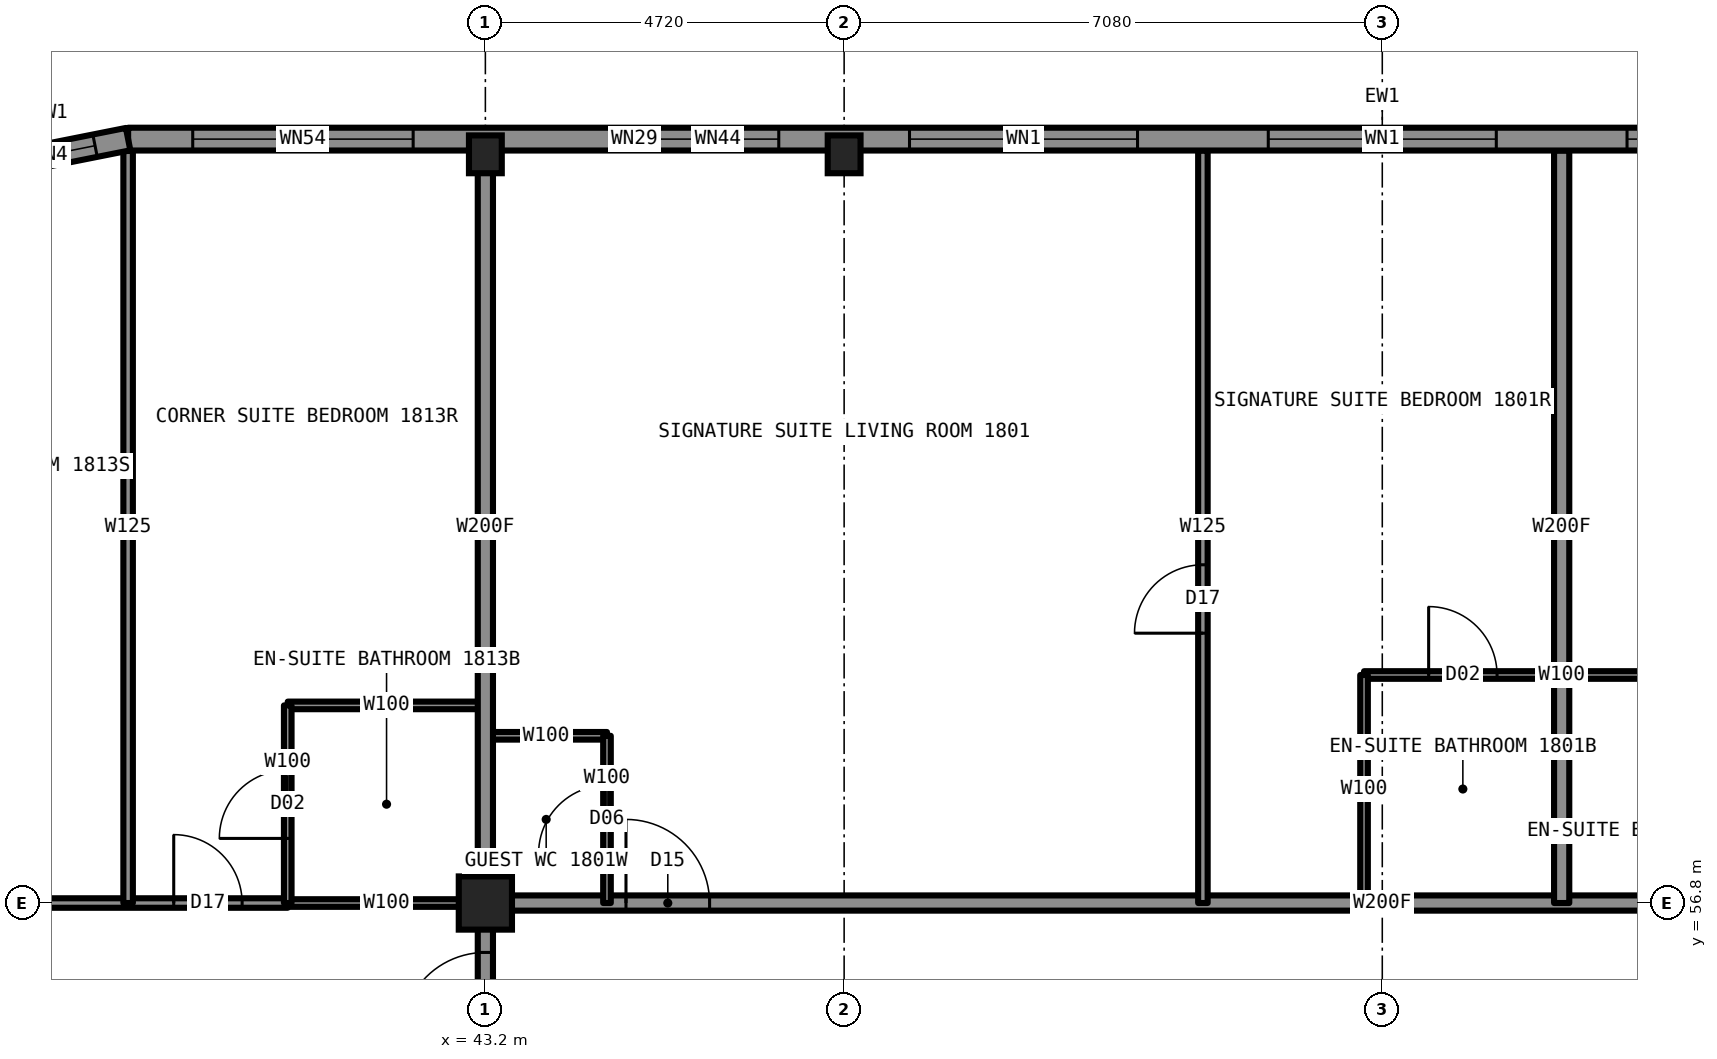
"""IFC4 building model, lengths in metres.
Left out: names, types, materials, properties, quantities, classifications, styles, units other than length and angle.
Written with IfcOpenShell. Run it as: python <this file> out.ifc"""

import sys

from ifc_helpers import new_model, si_unit, direction, frame, frame_2d, origin, origin_2d, place, context, subcontext, project, spatial, rectangle, hollow_rectangle, i_section, extrude, element, fill, save


model = new_model("IFC4")
c1 = context("Model", 3, precision=1e-05, world=origin(), true_north=direction((0.0, 1.0)))
c2 = subcontext(c1, "Body", "Model", "MODEL_VIEW")
j1 = project(units=[si_unit("LENGTHUNIT", "METRE"), si_unit("PLANEANGLEUNIT", "RADIAN")], contexts=[c1])
p1 = place(None, origin())
s1 = spatial("IfcSite", under=j1, at=p1, CompositionType="ELEMENT")
p2 = place(p1, origin())
s2 = spatial("IfcBuilding", under=s1, at=p2, CompositionType="ELEMENT")
p3 = place(p2, frame((0.0, 0.0, 70.5)))
s3 = spatial("IfcBuildingStorey", under=s2, at=p3, CompositionType="ELEMENT", Elevation=70.5)
for number, where, z_axis, x_axis in (
    (1, (43.2, 66.65, 0.0), (0.0, 0.0, 1.0), (1.0, 0.0, 0.0)),
    (2, (47.92, 66.65, 0.0), (0.0, 0.0, 1.0), (1.0, 0.0, 0.0)),
):
    element("IfcColumn", number, at=place(p3, frame(where, z_axis=z_axis, x_axis=x_axis)), inside=s3, PredefinedType="COLUMN", context=c2, shape_type="SweptSolid", body=[
        extrude(i_section(OverallWidth=0.432, OverallDepth=0.498, WebThickness=0.056, FlangeThickness=0.089, at=origin_2d()), origin(), (0.0, 0.0, 1.0), 3.5),
    ])
p4 = place(p3, frame((43.2, 56.8, 0.0), z_axis=(0.0, 0.0, 1.0), x_axis=(1.0, 0.0, 0.0)))
e3 = element("IfcColumn", 3, at=p4, inside=s3, PredefinedType="COLUMN", context=c2, shape_type="SweptSolid", body=[
    extrude(hollow_rectangle(XDim=0.7, YDim=0.7, WallThickness=0.06, at=origin_2d()), origin(), (0.0, 0.0, 1.0), 3.5),
])
p5 = place(p3, frame((40.6, 56.8, 0.0), z_axis=(0.0, 0.0, 1.0), x_axis=(1.0, 0.0, 0.0)))
e4 = element("IfcWall", 4, at=p5, inside=s3, PredefinedType="PARTITIONING", context=c2, shape_type="SweptSolid", body=[
    extrude(rectangle(XDim=2.6, YDim=0.1, at=frame_2d((1.3, 0.0))), origin(), (0.0, 0.0, 1.0), 2.573),
])
p6 = place(p3, frame((43.2, 56.8, 0.0), z_axis=(0.0, 0.0, 1.0), x_axis=(1.0, 0.0, 0.0)))
e5 = element("IfcWall", 5, at=p6, inside=s3, PredefinedType="PARTITIONING", context=c2, shape_type="SweptSolid", body=[
    extrude(rectangle(XDim=23.6, YDim=0.2, at=frame_2d((11.8, 0.0))), origin(), (0.0, 0.0, 1.0), 3.33),
])
p7 = place(p6, frame((1.85, 0.0, 0.0)))
e6 = element("IfcOpeningElement", 6, at=p7, cuts=e5, PredefinedType="OPENING", context=c2, shape_type="SweptSolid", body=[
    extrude(rectangle(XDim=1.1, YDim=2.2, at=frame_2d((0.55, 1.1))), frame((0.0, 0.11, 0.0), z_axis=(0.0, -1.0, 0.0), x_axis=(1.0, 0.0, 0.0)), (0.0, 0.0, 1.0), 0.22),
])
p8 = place(p6, frame((17.16, 0.0, 0.0)))
e7 = element("IfcOpeningElement", 7, at=p8, cuts=e5, PredefinedType="OPENING", context=c2, shape_type="SweptSolid", body=[
    extrude(rectangle(XDim=1.0, YDim=2.2, at=frame_2d((0.5, 1.1))), frame((0.0, 0.11, 0.0), z_axis=(0.0, -1.0, 0.0), x_axis=(1.0, 0.0, 0.0)), (0.0, 0.0, 1.0), 0.22),
])
p9 = place(p3, frame((33.3, 56.8, 0.0), z_axis=(0.0, 0.0, 1.0), x_axis=(1.0, 0.0, 0.0)))
e8 = element("IfcWall", 8, at=p9, inside=s3, PredefinedType="PARTITIONING", context=c2, shape_type="SweptSolid", body=[
    extrude(rectangle(XDim=7.3, YDim=0.125, at=frame_2d((3.65, 0.0))), origin(), (0.0, 0.0, 1.0), 2.573),
])
p10 = place(p9, frame((5.8, 0.0, 0.0)))
e9 = element("IfcOpeningElement", 9, at=p10, cuts=e8, PredefinedType="OPENING", context=c2, shape_type="SweptSolid", body=[
    extrude(rectangle(XDim=0.9, YDim=2.2, at=frame_2d((0.45, 1.1))), frame((0.0, 0.073, 0.0), z_axis=(0.0, -1.0, 0.0), x_axis=(1.0, 0.0, 0.0)), (0.0, 0.0, 1.0), 0.145),
])
p11 = place(p9, frame((2.0, 0.0, 0.0)))
e10 = element("IfcOpeningElement", 10, at=p11, cuts=e8, PredefinedType="OPENING", context=c2, shape_type="SweptSolid", body=[
    extrude(rectangle(XDim=0.9, YDim=2.2, at=frame_2d((0.45, 1.1))), frame((0.0, 0.073, 0.0), z_axis=(0.0, -1.0, 0.0), x_axis=(1.0, 0.0, 0.0)), (0.0, 0.0, 1.0), 0.145),
])
p12 = place(p3, frame((43.2, 59.0, 0.0), z_axis=(0.0, 0.0, 1.0), x_axis=(1.0, 0.0, 0.0)))
e11 = element("IfcWall", 11, at=p12, inside=s3, PredefinedType="PARTITIONING", context=c2, shape_type="SweptSolid", body=[
    extrude(rectangle(XDim=1.6, YDim=0.1, at=frame_2d((0.8, 0.0))), origin(), (0.0, 0.0, 1.0), 3.33),
])
p13 = place(p3, frame((40.6, 59.4, 0.0), z_axis=(0.0, 0.0, 1.0), x_axis=(1.0, 0.0, 0.0)))
e12 = element("IfcWall", 12, at=p13, inside=s3, PredefinedType="PARTITIONING", context=c2, shape_type="SweptSolid", body=[
    extrude(rectangle(XDim=2.6, YDim=0.1, at=frame_2d((1.3, 0.0))), origin(), (0.0, 0.0, 1.0), 3.33),
])
p14 = place(p3, frame((54.76, 59.8, 0.0), z_axis=(0.0, 0.0, 1.0), x_axis=(1.0, 0.0, 0.0)))
e13 = element("IfcWall", 13, at=p14, inside=s3, PredefinedType="PARTITIONING", context=c2, shape_type="SweptSolid", body=[
    extrude(rectangle(XDim=5.2, YDim=0.1, at=frame_2d((2.6, 0.0))), origin(), (0.0, 0.0, 1.0), 3.33),
])
p15 = place(p14, frame((0.85, 0.0, 0.0)))
e14 = element("IfcOpeningElement", 14, at=p15, cuts=e13, PredefinedType="OPENING", context=c2, shape_type="SweptSolid", body=[
    extrude(rectangle(XDim=0.9, YDim=2.1, at=frame_2d((0.45, 1.05))), frame((0.0, 0.06, 0.0), z_axis=(0.0, -1.0, 0.0), x_axis=(1.0, 0.0, 0.0)), (0.0, 0.0, 1.0), 0.12),
])
p16 = place(p3, frame((54.76, 56.8, 0.0), z_axis=(0.0, 0.0, 1.0), x_axis=(0.0, 1.0, 0.0)))
e15 = element("IfcWall", 15, at=p16, inside=s3, PredefinedType="PARTITIONING", context=c2, shape_type="SweptSolid", body=[
    extrude(rectangle(XDim=3.0, YDim=0.1, at=frame_2d((1.5, 0.0))), origin(), (0.0, 0.0, 1.0), 3.33),
])
p17 = place(p3, frame((44.8, 56.8, 0.0), z_axis=(0.0, 0.0, 1.0), x_axis=(0.0, 1.0, 0.0)))
e16 = element("IfcWall", 16, at=p17, inside=s3, PredefinedType="PARTITIONING", context=c2, shape_type="SweptSolid", body=[
    extrude(rectangle(XDim=2.2, YDim=0.1, at=frame_2d((1.1, 0.0))), origin(), (0.0, 0.0, 1.0), 3.33),
])
p18 = place(p17, frame((0.65, 0.0, 0.0)))
e17 = element("IfcOpeningElement", 17, at=p18, cuts=e16, PredefinedType="OPENING", context=c2, shape_type="SweptSolid", body=[
    extrude(rectangle(XDim=0.9, YDim=2.1, at=frame_2d((0.45, 1.05))), frame((0.0, 0.06, 0.0), z_axis=(0.0, -1.0, 0.0), x_axis=(1.0, 0.0, 0.0)), (0.0, 0.0, 1.0), 0.12),
])
p19 = place(p3, frame((43.2, 33.2, 0.0), z_axis=(0.0, 0.0, 1.0), x_axis=(0.0, 1.0, 0.0)))
e18 = element("IfcWall", 18, at=p19, inside=s3, PredefinedType="PARTITIONING", context=c2, shape_type="SweptSolid", body=[
    extrude(rectangle(XDim=23.6, YDim=0.2, at=frame_2d((11.8, 0.0))), origin(), (0.0, 0.0, 1.0), 3.33),
])
p20 = place(p19, frame((7.87, 0.0, 0.0)))
e19 = element("IfcOpeningElement", 19, at=p20, cuts=e18, PredefinedType="OPENING", context=c2, shape_type="SweptSolid", body=[
    extrude(rectangle(XDim=1.0, YDim=2.2, at=frame_2d((0.5, 1.1))), frame((0.0, 0.11, 0.0), z_axis=(0.0, -1.0, 0.0), x_axis=(1.0, 0.0, 0.0)), (0.0, 0.0, 1.0), 0.22),
])
p21 = place(p19, frame((12.44, 0.0, 0.0)))
e20 = element("IfcOpeningElement", 20, at=p21, cuts=e18, PredefinedType="OPENING", context=c2, shape_type="SweptSolid", body=[
    extrude(rectangle(XDim=1.0, YDim=2.2, at=frame_2d((0.5, 1.1))), frame((0.0, 0.11, 0.0), z_axis=(0.0, -1.0, 0.0), x_axis=(1.0, 0.0, 0.0)), (0.0, 0.0, 1.0), 0.22),
])
p22 = place(p19, frame((21.85, 0.0, 0.0)))
e21 = element("IfcOpeningElement", 21, at=p22, cuts=e18, PredefinedType="OPENING", context=c2, shape_type="SweptSolid", body=[
    extrude(rectangle(XDim=1.1, YDim=2.2, at=frame_2d((0.55, 1.1))), frame((0.0, 0.11, 0.0), z_axis=(0.0, -1.0, 0.0), x_axis=(1.0, 0.0, 0.0)), (0.0, 0.0, 1.0), 0.22),
])
p23 = place(p19, frame((0.66, 0.0, 0.0)))
e22 = element("IfcOpeningElement", 22, at=p23, cuts=e18, PredefinedType="OPENING", context=c2, shape_type="SweptSolid", body=[
    extrude(rectangle(XDim=1.1, YDim=2.2, at=frame_2d((0.55, 1.1))), frame((0.0, 0.11, 0.0), z_axis=(0.0, -1.0, 0.0), x_axis=(1.0, 0.0, 0.0)), (0.0, 0.0, 1.0), 0.22),
])
p24 = place(p3, frame((43.2, 56.8, 0.0), z_axis=(0.0, 0.0, 1.0), x_axis=(0.0, 1.0, 0.0)))
e23 = element("IfcWall", 23, at=p24, inside=s3, PredefinedType="PARTITIONING", context=c2, shape_type="SweptSolid", body=[
    extrude(rectangle(XDim=9.9, YDim=0.2, at=frame_2d((4.95, 0.0))), origin(), (0.0, 0.0, 1.0), 2.573),
])
p25 = place(p3, frame((40.6, 56.8, 0.0), z_axis=(0.0, 0.0, 1.0), x_axis=(0.0, 1.0, 0.0)))
e24 = element("IfcWall", 24, at=p25, inside=s3, PredefinedType="PARTITIONING", context=c2, shape_type="SweptSolid", body=[
    extrude(rectangle(XDim=2.6, YDim=0.1, at=frame_2d((1.3, 0.0))), origin(), (0.0, 0.0, 1.0), 3.33),
])
p26 = place(p25, frame((0.85, 0.0, 0.0)))
e25 = element("IfcOpeningElement", 25, at=p26, cuts=e24, PredefinedType="OPENING", context=c2, shape_type="SweptSolid", body=[
    extrude(rectangle(XDim=0.9, YDim=2.1, at=frame_2d((0.45, 1.05))), frame((0.0, 0.06, 0.0), z_axis=(0.0, -1.0, 0.0), x_axis=(1.0, 0.0, 0.0)), (0.0, 0.0, 1.0), 0.12),
])
p27 = place(p3, frame((38.5, 56.8, 0.0), z_axis=(0.0, 0.0, 1.0), x_axis=(0.0, 1.0, 0.0)))
e26 = element("IfcWall", 26, at=p27, inside=s3, PredefinedType="PARTITIONING", context=c2, shape_type="SweptSolid", body=[
    extrude(rectangle(XDim=9.894, YDim=0.125, at=frame_2d((4.947, 0.0))), origin(), (0.0, 0.0, 1.0), 3.33),
])
p28 = place(p3, frame((52.64, 56.8, 0.0), z_axis=(0.0, 0.0, 1.0), x_axis=(0.0, 1.0, 0.0)))
e27 = element("IfcWall", 27, at=p28, inside=s3, PredefinedType="PARTITIONING", context=c2, shape_type="SweptSolid", body=[
    extrude(rectangle(XDim=9.9, YDim=0.125, at=frame_2d((4.95, 0.0))), origin(), (0.0, 0.0, 1.0), 3.33),
])
p29 = place(p28, frame((3.55, 0.0, 0.0)))
e28 = element("IfcOpeningElement", 28, at=p29, cuts=e27, PredefinedType="OPENING", context=c2, shape_type="SweptSolid", body=[
    extrude(rectangle(XDim=0.9, YDim=2.2, at=frame_2d((0.45, 1.1))), frame((0.0, 0.073, 0.0), z_axis=(0.0, -1.0, 0.0), x_axis=(1.0, 0.0, 0.0)), (0.0, 0.0, 1.0), 0.145),
])
p30 = place(p3, frame((57.36, 56.8, 0.0), z_axis=(0.0, 0.0, 1.0), x_axis=(0.0, 1.0, 0.0)))
e29 = element("IfcWall", 29, at=p30, inside=s3, PredefinedType="PARTITIONING", context=c2, shape_type="SweptSolid", body=[
    extrude(rectangle(XDim=9.9, YDim=0.2, at=frame_2d((4.95, 0.0))), origin(), (0.0, 0.0, 1.0), 3.33),
])
p31 = place(p3, frame((71.5, 66.85, 0.0), z_axis=(0.0, 0.0, 1.0), x_axis=(-1.0, 0.0, 0.0)))
e30 = element("IfcWall", 30, at=p31, inside=s3, PredefinedType="SOLIDWALL", context=c2, shape_type="SweptSolid", body=[
    extrude(rectangle(XDim=33.0, YDim=0.3, at=frame_2d((16.5, 0.0))), origin(), (0.0, 0.0, 1.0), 2.83),
])
p32 = place(p31, frame((0.85, 0.0, 0.5)))
e31 = element("IfcOpeningElement", 31, at=p32, cuts=e30, PredefinedType="OPENING", context=c2, shape_type="SweptSolid", body=[
    extrude(rectangle(XDim=2.9, YDim=2.0, at=frame_2d((1.45, 1.0))), frame((0.0, 0.16, 0.0), z_axis=(0.0, -1.0, 0.0), x_axis=(1.0, 0.0, 0.0)), (0.0, 0.0, 1.0), 0.32),
])
p33 = place(p31, frame((6.96, 0.0, 0.55)))
e32 = element("IfcOpeningElement", 32, at=p33, cuts=e30, PredefinedType="OPENING", context=c2, shape_type="SweptSolid", body=[
    extrude(rectangle(XDim=1.6, YDim=1.9, at=frame_2d((0.8, 0.95))), frame((0.0, 0.16, 0.0), z_axis=(0.0, -1.0, 0.0), x_axis=(1.0, 0.0, 0.0)), (0.0, 0.0, 1.0), 0.32),
])
p34 = place(p31, frame((10.28, 0.0, 0.5)))
e33 = element("IfcOpeningElement", 33, at=p34, cuts=e30, PredefinedType="OPENING", context=c2, shape_type="SweptSolid", body=[
    extrude(rectangle(XDim=3.0, YDim=2.0, at=frame_2d((1.5, 1.0))), frame((0.0, 0.16, 0.0), z_axis=(0.0, -1.0, 0.0), x_axis=(1.0, 0.0, 0.0)), (0.0, 0.0, 1.0), 0.32),
])
p35 = place(p31, frame((15.0, 0.0, 0.5)))
e34 = element("IfcOpeningElement", 34, at=p35, cuts=e30, PredefinedType="OPENING", context=c2, shape_type="SweptSolid", body=[
    extrude(rectangle(XDim=3.0, YDim=2.0, at=frame_2d((1.5, 1.0))), frame((0.0, 0.16, 0.0), z_axis=(0.0, -1.0, 0.0), x_axis=(1.0, 0.0, 0.0)), (0.0, 0.0, 1.0), 0.32),
])
p36 = place(p31, frame((19.72, 0.0, 0.5)))
e35 = element("IfcOpeningElement", 35, at=p36, cuts=e30, PredefinedType="OPENING", context=c2, shape_type="SweptSolid", body=[
    extrude(rectangle(XDim=3.0, YDim=2.0, at=frame_2d((1.5, 1.0))), frame((0.0, 0.16, 0.0), z_axis=(0.0, -1.0, 0.0), x_axis=(1.0, 0.0, 0.0)), (0.0, 0.0, 1.0), 0.32),
])
p37 = place(p31, frame((24.44, 0.0, 0.55)))
e36 = element("IfcOpeningElement", 36, at=p37, cuts=e30, PredefinedType="OPENING", context=c2, shape_type="SweptSolid", body=[
    extrude(rectangle(XDim=1.6, YDim=1.9, at=frame_2d((0.8, 0.95))), frame((0.0, 0.16, 0.0), z_axis=(0.0, -1.0, 0.0), x_axis=(1.0, 0.0, 0.0)), (0.0, 0.0, 1.0), 0.32),
])
p38 = place(p31, frame((29.25, 0.0, 0.5)))
e37 = element("IfcOpeningElement", 37, at=p38, cuts=e30, PredefinedType="OPENING", context=c2, shape_type="SweptSolid", body=[
    extrude(rectangle(XDim=2.9, YDim=2.0, at=frame_2d((1.45, 1.0))), frame((0.0, 0.16, 0.0), z_axis=(0.0, -1.0, 0.0), x_axis=(1.0, 0.0, 0.0)), (0.0, 0.0, 1.0), 0.32),
])
p39 = place(p31, frame((6.31, 0.0, 1.45)))
e38 = element("IfcOpeningElement", 38, at=p39, cuts=e30, PredefinedType="OPENING", context=c2, shape_type="SweptSolid", body=[
    extrude(rectangle(XDim=0.6, YDim=1.0, at=frame_2d((0.3, 0.5))), frame((0.0, 0.16, 0.0), z_axis=(0.0, -1.0, 0.0), x_axis=(1.0, 0.0, 0.0)), (0.0, 0.0, 1.0), 0.32),
])
p40 = place(p31, frame((26.04, 0.0, 1.45)))
e39 = element("IfcOpeningElement", 39, at=p40, cuts=e30, PredefinedType="OPENING", context=c2, shape_type="SweptSolid", body=[
    extrude(rectangle(XDim=0.6, YDim=1.0, at=frame_2d((0.3, 0.5))), frame((0.0, 0.16, 0.0), z_axis=(0.0, -1.0, 0.0), x_axis=(1.0, 0.0, 0.0)), (0.0, 0.0, 1.0), 0.32),
])
p41 = place(p3, frame((38.5, 66.85, 0.0), z_axis=(0.0, 0.0, 1.0), x_axis=(-0.980787050784, -0.195081421501, 0.0)))
e40 = element("IfcWall", 40, at=p41, inside=s3, PredefinedType="SOLIDWALL", context=c2, shape_type="SweptSolid", body=[
    extrude(rectangle(XDim=2.087, YDim=0.3, at=frame_2d((1.044, 0.0))), origin(), (0.0, 0.0, 1.0), 3.33),
])
p42 = place(p41, frame((0.444, 0.0, 0.5)))
e41 = element("IfcOpeningElement", 41, at=p42, cuts=e40, PredefinedType="OPENING", context=c2, shape_type="SweptSolid", body=[
    extrude(rectangle(XDim=1.2, YDim=2.0, at=frame_2d((0.6, 1.0))), frame((0.0, 0.16, 0.0), z_axis=(0.0, -1.0, 0.0), x_axis=(1.0, 0.0, 0.0)), (0.0, 0.0, 1.0), 0.32),
])
p43 = place(p7, origin())
e42 = element("IfcDoor", 42, at=p43, inside=s3, OperationType="SINGLE_SWING_LEFT", PredefinedType="DOOR", context=c2, shape_type="SweptSolid", body=[
    extrude(rectangle(XDim=1.1, YDim=2.2, at=frame_2d((0.55, 1.1))), frame((0.0, 0.025, 0.0), z_axis=(0.0, -1.0, 0.0), x_axis=(1.0, 0.0, 0.0)), (0.0, 0.0, 1.0), 0.05),
])
fill(e6, e42)
p44 = place(p15, origin())
e43 = element("IfcDoor", 43, at=p44, inside=s3, OperationType="SINGLE_SWING_RIGHT", PredefinedType="DOOR", context=c2, shape_type="SweptSolid", body=[
    extrude(rectangle(XDim=0.9, YDim=2.1, at=frame_2d((0.45, 1.05))), frame((0.0, 0.025, 0.0), z_axis=(0.0, -1.0, 0.0), x_axis=(1.0, 0.0, 0.0)), (0.0, 0.0, 1.0), 0.05),
])
fill(e14, e43)
p45 = place(p29, origin())
e44 = element("IfcDoor", 44, at=p45, inside=s3, OperationType="SINGLE_SWING_LEFT", PredefinedType="DOOR", context=c2, shape_type="SweptSolid", body=[
    extrude(rectangle(XDim=0.9, YDim=2.2, at=frame_2d((0.45, 1.1))), frame((0.0, 0.025, 0.0), z_axis=(0.0, -1.0, 0.0), x_axis=(1.0, 0.0, 0.0)), (0.0, 0.0, 1.0), 0.05),
])
fill(e28, e44)
p46 = place(p18, origin())
e45 = element("IfcDoor", 45, at=p46, inside=s3, OperationType="SINGLE_SWING_LEFT", PredefinedType="DOOR", context=c2, shape_type="SweptSolid", body=[
    extrude(rectangle(XDim=0.9, YDim=2.1, at=frame_2d((0.45, 1.05))), frame((0.0, 0.025, 0.0), z_axis=(0.0, -1.0, 0.0), x_axis=(1.0, 0.0, 0.0)), (0.0, 0.0, 1.0), 0.05),
])
fill(e17, e45)
p47 = place(p22, origin())
e46 = element("IfcDoor", 46, at=p47, inside=s3, OperationType="SINGLE_SWING_LEFT", PredefinedType="DOOR", context=c2, shape_type="SweptSolid", body=[
    extrude(rectangle(XDim=1.1, YDim=2.2, at=frame_2d((0.55, 1.1))), frame((0.0, 0.025, 0.0), z_axis=(0.0, -1.0, 0.0), x_axis=(1.0, 0.0, 0.0)), (0.0, 0.0, 1.0), 0.05),
])
fill(e21, e46)
p48 = place(p26, origin())
e47 = element("IfcDoor", 47, at=p48, inside=s3, OperationType="SINGLE_SWING_RIGHT", PredefinedType="DOOR", context=c2, shape_type="SweptSolid", body=[
    extrude(rectangle(XDim=0.9, YDim=2.1, at=frame_2d((0.45, 1.05))), frame((0.0, 0.025, 0.0), z_axis=(0.0, -1.0, 0.0), x_axis=(1.0, 0.0, 0.0)), (0.0, 0.0, 1.0), 0.05),
])
fill(e25, e47)
p49 = place(p10, origin())
e48 = element("IfcDoor", 48, at=p49, inside=s3, OperationType="SINGLE_SWING_LEFT", PredefinedType="DOOR", context=c2, shape_type="SweptSolid", body=[
    extrude(rectangle(XDim=0.9, YDim=2.2, at=frame_2d((0.45, 1.1))), frame((0.0, 0.025, 0.0), z_axis=(0.0, -1.0, 0.0), x_axis=(1.0, 0.0, 0.0)), (0.0, 0.0, 1.0), 0.05),
])
fill(e9, e48)
p50 = place(p34, origin())
e49 = element("IfcWindow", 49, at=p50, inside=s3, PartitioningType="SINGLE_PANEL", PredefinedType="WINDOW", context=c2, shape_type="SweptSolid", body=[
    extrude(rectangle(XDim=3.0, YDim=2.0, at=frame_2d((1.5, 1.0))), frame((0.0, 0.03, 0.0), z_axis=(0.0, -1.0, 0.0), x_axis=(1.0, 0.0, 0.0)), (0.0, 0.0, 1.0), 0.06),
])
fill(e33, e49)
p51 = place(p35, origin())
e50 = element("IfcWindow", 50, at=p51, inside=s3, PartitioningType="SINGLE_PANEL", PredefinedType="WINDOW", context=c2, shape_type="SweptSolid", body=[
    extrude(rectangle(XDim=3.0, YDim=2.0, at=frame_2d((1.5, 1.0))), frame((0.0, 0.03, 0.0), z_axis=(0.0, -1.0, 0.0), x_axis=(1.0, 0.0, 0.0)), (0.0, 0.0, 1.0), 0.06),
])
fill(e34, e50)
p52 = place(p36, origin())
e51 = element("IfcWindow", 51, at=p52, inside=s3, PartitioningType="SINGLE_PANEL", PredefinedType="WINDOW", context=c2, shape_type="SweptSolid", body=[
    extrude(rectangle(XDim=3.0, YDim=2.0, at=frame_2d((1.5, 1.0))), frame((0.0, 0.03, 0.0), z_axis=(0.0, -1.0, 0.0), x_axis=(1.0, 0.0, 0.0)), (0.0, 0.0, 1.0), 0.06),
])
fill(e35, e51)
p53 = place(p37, origin())
e52 = element("IfcWindow", 52, at=p53, inside=s3, PartitioningType="SINGLE_PANEL", PredefinedType="WINDOW", context=c2, shape_type="SweptSolid", body=[
    extrude(rectangle(XDim=1.6, YDim=1.9, at=frame_2d((0.8, 0.95))), frame((0.0, 0.03, 0.0), z_axis=(0.0, -1.0, 0.0), x_axis=(1.0, 0.0, 0.0)), (0.0, 0.0, 1.0), 0.06),
])
fill(e36, e52)
p54 = place(p38, origin())
e53 = element("IfcWindow", 53, at=p54, inside=s3, PartitioningType="SINGLE_PANEL", PredefinedType="WINDOW", context=c2, shape_type="SweptSolid", body=[
    extrude(rectangle(XDim=2.9, YDim=2.0, at=frame_2d((1.45, 1.0))), frame((0.0, 0.03, 0.0), z_axis=(0.0, -1.0, 0.0), x_axis=(1.0, 0.0, 0.0)), (0.0, 0.0, 1.0), 0.06),
])
fill(e37, e53)
p55 = place(p42, origin())
e54 = element("IfcWindow", 54, at=p55, inside=s3, PartitioningType="SINGLE_PANEL", PredefinedType="WINDOW", context=c2, shape_type="SweptSolid", body=[
    extrude(rectangle(XDim=1.2, YDim=2.0, at=frame_2d((0.6, 1.0))), frame((0.0, 0.03, 0.0), z_axis=(0.0, -1.0, 0.0), x_axis=(1.0, 0.0, 0.0)), (0.0, 0.0, 1.0), 0.06),
])
fill(e41, e54)
p56 = place(p40, origin())
e55 = element("IfcWindow", 55, at=p56, inside=s3, PartitioningType="SINGLE_PANEL", PredefinedType="WINDOW", context=c2, shape_type="SweptSolid", body=[
    extrude(rectangle(XDim=0.6, YDim=1.0, at=frame_2d((0.3, 0.5))), frame((0.0, 0.03, 0.0), z_axis=(0.0, -1.0, 0.0), x_axis=(1.0, 0.0, 0.0)), (0.0, 0.0, 1.0), 0.06),
])
fill(e39, e55)
save(model, sys.argv[1])
